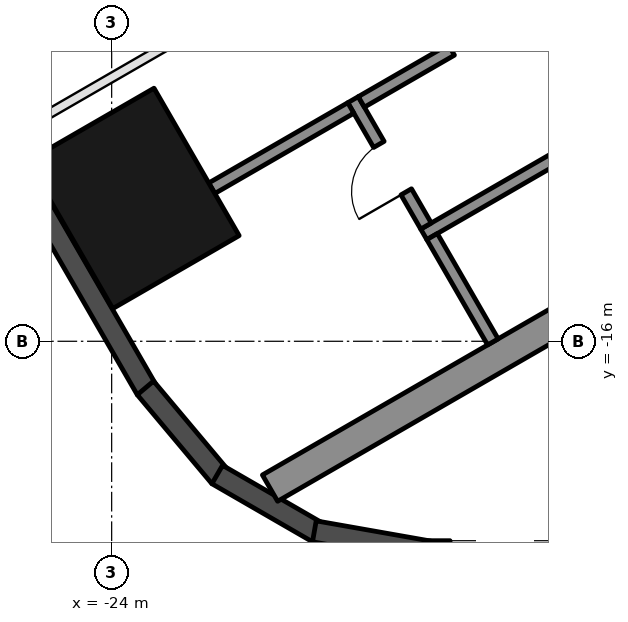
"""IFC4 building model, lengths in metres.
Left out: names, types, materials, properties, quantities, classifications, styles, units other than length and angle.
Written with IfcOpenShell. Run it as: python <this file> out.ifc"""

import sys

from ifc_helpers import new_model, si_unit, direction, frame, frame_2d, origin, origin_2d, place, context, subcontext, project, spatial, rectangle, hollow_rectangle, extrude, element, fill, save


model = new_model("IFC4")
c1 = context("Model", 3, precision=1e-05, world=origin(), true_north=direction((0.0, 1.0)))
c2 = subcontext(c1, "Body", "Model", "MODEL_VIEW")
j1 = project(units=[si_unit("LENGTHUNIT", "METRE"), si_unit("PLANEANGLEUNIT", "RADIAN")], contexts=[c1])
p1 = place(None, origin())
s1 = spatial("IfcSite", under=j1, at=p1, CompositionType="ELEMENT")
p2 = place(p1, origin())
s2 = spatial("IfcBuilding", under=s1, at=p2, CompositionType="ELEMENT")
p3 = place(p2, frame((0.0, 0.0, 116.8)))
s3 = spatial("IfcBuildingStorey", under=s2, at=p3, CompositionType="ELEMENT", Elevation=116.8)
p4 = place(p3, frame((-23.643, -13.65, 0.0), z_axis=(0.0, 0.0, 1.0), x_axis=(-0.5, 0.866025403784, 0.0)))
e1 = element("IfcColumn", 1, at=p4, inside=s3, PredefinedType="COLUMN", context=c2, shape_type="SweptSolid", body=[
    extrude(hollow_rectangle(XDim=2.8, YDim=2.4, WallThickness=0.07, at=origin_2d()), origin(), (0.0, 0.0, 1.0), 3.7),
])
p5 = place(p3, frame((-26.257, -11.893, 0.0), z_axis=(0.0, 0.0, 1.0), x_axis=(0.500018773155, -0.866014564827, 0.0)))
e2 = element("IfcWall", 2, at=p5, inside=s3, PredefinedType="SOLIDWALL", context=c2, shape_type="SweptSolid", body=[
    extrude(rectangle(XDim=5.658, YDim=0.35, at=frame_2d((2.829, 0.0))), origin(), (0.0, 0.0, 1.0), 3.55),
])
for number, where, z_axis, x_axis in (
    (3, (-23.445, -16.768, 0.0), (0.0, 0.0, 1.0), (0.643, -0.766, 0.0)),
    (4, (-22.264, -18.192, 0.0), (0.0, 0.0, 1.0), (0.866, -0.5, 0.0)),
):
    element("IfcWall", number, at=place(p3, frame(where, z_axis=z_axis, x_axis=x_axis)), inside=s3, PredefinedType="SOLIDWALL", context=c2, shape_type="SweptSolid", body=[
        extrude(rectangle(XDim=1.91, YDim=0.35, at=frame_2d((0.955, 0.0))), origin(), (0.0, 0.0, 1.0), 3.55),
    ])
p6 = place(p3, frame((-20.667, -19.126, 0.0), z_axis=(0.0, 0.0, 1.0), x_axis=(0.984798995425, -0.173697837091, 0.0)))
e5 = element("IfcWall", 5, at=p6, inside=s3, PredefinedType="SOLIDWALL", context=c2, shape_type="SweptSolid", body=[
    extrude(rectangle(XDim=1.91, YDim=0.35, at=frame_2d((0.955, 0.0))), origin(), (0.0, 0.0, 1.0), 3.55),
])
p7 = place(p3, frame((-18.816, -19.455, 0.0), z_axis=(0.0, 0.0, 1.0), x_axis=(1.0, 0.0, 0.0)))
e6 = element("IfcWall", 6, at=p7, inside=s3, PredefinedType="SOLIDWALL", context=c2, shape_type="SweptSolid", body=[
    extrude(rectangle(XDim=11.816, YDim=0.35, at=frame_2d((5.908, 0.0))), origin(), (0.0, 0.0, 1.0), 3.55),
])
p8 = place(p7, frame((0.381, 0.0, 0.3)))
e7 = element("IfcOpeningElement", 7, at=p8, cuts=e6, PredefinedType="OPENING", context=c2, shape_type="SweptSolid", body=[
    extrude(rectangle(XDim=1.8, YDim=2.65, at=frame_2d((0.9, 1.325))), frame((0.0, 0.185, 0.0), z_axis=(0.0, -1.0, 0.0), x_axis=(1.0, 0.0, 0.0)), (0.0, 0.0, 1.0), 0.37),
])
p9 = place(p7, frame((7.716, 0.0, 0.0)))
e8 = element("IfcOpeningElement", 8, at=p9, cuts=e6, PredefinedType="OPENING", context=c2, shape_type="SweptSolid", body=[
    extrude(rectangle(XDim=2.4, YDim=2.4, at=frame_2d((1.2, 1.2))), frame((0.0, 0.185, 0.0), z_axis=(0.0, -1.0, 0.0), x_axis=(1.0, 0.0, 0.0)), (0.0, 0.0, 1.0), 0.37),
])
p10 = place(p7, frame((3.816, 0.0, 0.3)))
e9 = element("IfcOpeningElement", 9, at=p10, cuts=e6, PredefinedType="OPENING", context=c2, shape_type="SweptSolid", body=[
    extrude(rectangle(XDim=1.6, YDim=2.65, at=frame_2d((0.8, 1.325))), frame((0.0, 0.185, 0.0), z_axis=(0.0, -1.0, 0.0), x_axis=(1.0, 0.0, 0.0)), (0.0, 0.0, 1.0), 0.37),
])
p11 = place(p7, frame((5.716, 0.0, 0.3)))
e10 = element("IfcOpeningElement", 10, at=p11, cuts=e6, PredefinedType="OPENING", context=c2, shape_type="SweptSolid", body=[
    extrude(rectangle(XDim=1.6, YDim=2.65, at=frame_2d((0.8, 1.325))), frame((0.0, 0.185, 0.0), z_axis=(0.0, -1.0, 0.0), x_axis=(1.0, 0.0, 0.0)), (0.0, 0.0, 1.0), 0.37),
])
p12 = place(p3, frame((-8.547, -10.997, 0.0), z_axis=(0.0, 0.0, 1.0), x_axis=(-0.866025009528, -0.500000682871, 0.0)))
e11 = element("IfcWall", 11, at=p12, inside=s3, PredefinedType="SHEAR", context=c2, shape_type="SweptSolid", body=[
    extrude(rectangle(XDim=14.837, YDim=0.5, at=frame_2d((7.418, 0.0))), origin(), (0.0, 0.0, 1.0), 3.5),
])
p13 = place(p3, frame((-10.068, -9.162, 0.0), z_axis=(0.0, 0.0, 1.0), x_axis=(-0.866032725843, -0.499987317609, 0.0)))
e12 = element("IfcWall", 12, at=p13, inside=s3, PredefinedType="SHEAR", context=c2, shape_type="SweptSolid", body=[
    extrude(rectangle(XDim=10.16, YDim=0.2, at=frame_2d((5.08, 0.0))), origin(), (0.0, 0.0, 1.0), 3.5),
])
p14 = place(p13, frame((0.72, 0.0, 0.0)))
e13 = element("IfcOpeningElement", 13, at=p14, cuts=e12, PredefinedType="OPENING", context=c2, shape_type="SweptSolid", body=[
    extrude(rectangle(XDim=0.9, YDim=2.1, at=frame_2d((0.45, 1.05))), frame((0.0, 0.11, 0.0), z_axis=(0.0, -1.0, 0.0), x_axis=(1.0, 0.0, 0.0)), (0.0, 0.0, 1.0), 0.22),
])
p15 = place(p13, frame((5.8, 0.0, 0.0)))
e14 = element("IfcOpeningElement", 14, at=p15, cuts=e12, PredefinedType="OPENING", context=c2, shape_type="SweptSolid", body=[
    extrude(rectangle(XDim=0.9, YDim=2.1, at=frame_2d((0.45, 1.05))), frame((0.0, 0.11, 0.0), z_axis=(0.0, -1.0, 0.0), x_axis=(1.0, 0.0, 0.0)), (0.0, 0.0, 1.0), 0.22),
])
p16 = place(p3, frame((-20.031, -12.026, 0.0), z_axis=(0.0, 0.0, 1.0), x_axis=(0.500033551112, -0.866006032174, 0.0)))
e15 = element("IfcWall", 15, at=p16, inside=s3, PredefinedType="SHEAR", context=c2, shape_type="SweptSolid", body=[
    extrude(rectangle(XDim=2.4, YDim=0.2, at=frame_2d((1.2, 0.0))), origin(), (0.0, 0.0, 1.0), 3.5),
])
p17 = place(p16, frame((0.85, 0.0, 0.0)))
e16 = element("IfcOpeningElement", 16, at=p17, cuts=e15, PredefinedType="OPENING", context=c2, shape_type="SweptSolid", body=[
    extrude(rectangle(XDim=0.9, YDim=2.1, at=frame_2d((0.45, 1.05))), frame((0.0, 0.11, 0.0), z_axis=(0.0, -1.0, 0.0), x_axis=(1.0, 0.0, 0.0)), (0.0, 0.0, 1.0), 0.22),
])
p18 = place(p3, frame((-18.413, -11.208, 0.0), z_axis=(0.0, 0.0, 1.0), x_axis=(-0.866038183914, -0.499977863513, 0.0)))
e17 = element("IfcWall", 17, at=p18, inside=s3, PredefinedType="SHEAR", context=c2, shape_type="SweptSolid", body=[
    extrude(rectangle(XDim=1.71, YDim=0.2, at=frame_2d((0.855, 0.0))), origin(), (0.0, 0.0, 1.0), 3.5),
])
p19 = place(p3, frame((-18.73, -14.278, 0.0), z_axis=(0.0, 0.0, 1.0), x_axis=(0.50002537861, -0.866010750942, 0.0)))
e18 = element("IfcWall", 18, at=p19, inside=s3, PredefinedType="SHEAR", context=c2, shape_type="SweptSolid", body=[
    extrude(rectangle(XDim=2.0, YDim=0.2, at=frame_2d((1.0, 0.0))), origin(), (0.0, 0.0, 1.0), 3.5),
])
p20 = place(p3, frame((-20.067, -12.163, 0.0), z_axis=(0.0, 0.0, 1.0), x_axis=(-0.866060851709, -0.499938597367, 0.0)))
e19 = element("IfcWall", 19, at=p20, inside=s3, PredefinedType="SHEAR", context=c2, shape_type="SweptSolid", body=[
    extrude(rectangle(XDim=2.64, YDim=0.2, at=frame_2d((1.32, 0.0))), origin(), (0.0, 0.0, 1.0), 3.5),
])
p21 = place(p3, frame((-19.613, -9.13, 0.0), z_axis=(0.0, 0.0, 1.0), x_axis=(-0.866031734426, -0.499989034847, 0.0)))
e20 = element("IfcWall", 20, at=p21, inside=s3, PredefinedType="PARTITIONING", context=c2, shape_type="SweptSolid", body=[
    extrude(rectangle(XDim=6.95, YDim=0.15, at=frame_2d((3.475, 0.0))), origin(), (0.0, 0.0, 1.0), 3.5),
])
p22 = place(p17, frame((0.9, 0.0, 0.0), z_axis=(0.0, 0.0, 1.0), x_axis=(-1.0, 0.0, 0.0)))
e21 = element("IfcDoor", 21, at=p22, inside=s3, OperationType="SINGLE_SWING_LEFT", PredefinedType="DOOR", context=c2, shape_type="SweptSolid", body=[
    extrude(rectangle(XDim=0.9, YDim=2.1, at=frame_2d((0.45, 1.05))), frame((0.0, 0.025, 0.0), z_axis=(0.0, -1.0, 0.0), x_axis=(1.0, 0.0, 0.0)), (0.0, 0.0, 1.0), 0.05),
])
fill(e16, e21)
save(model, sys.argv[1])
